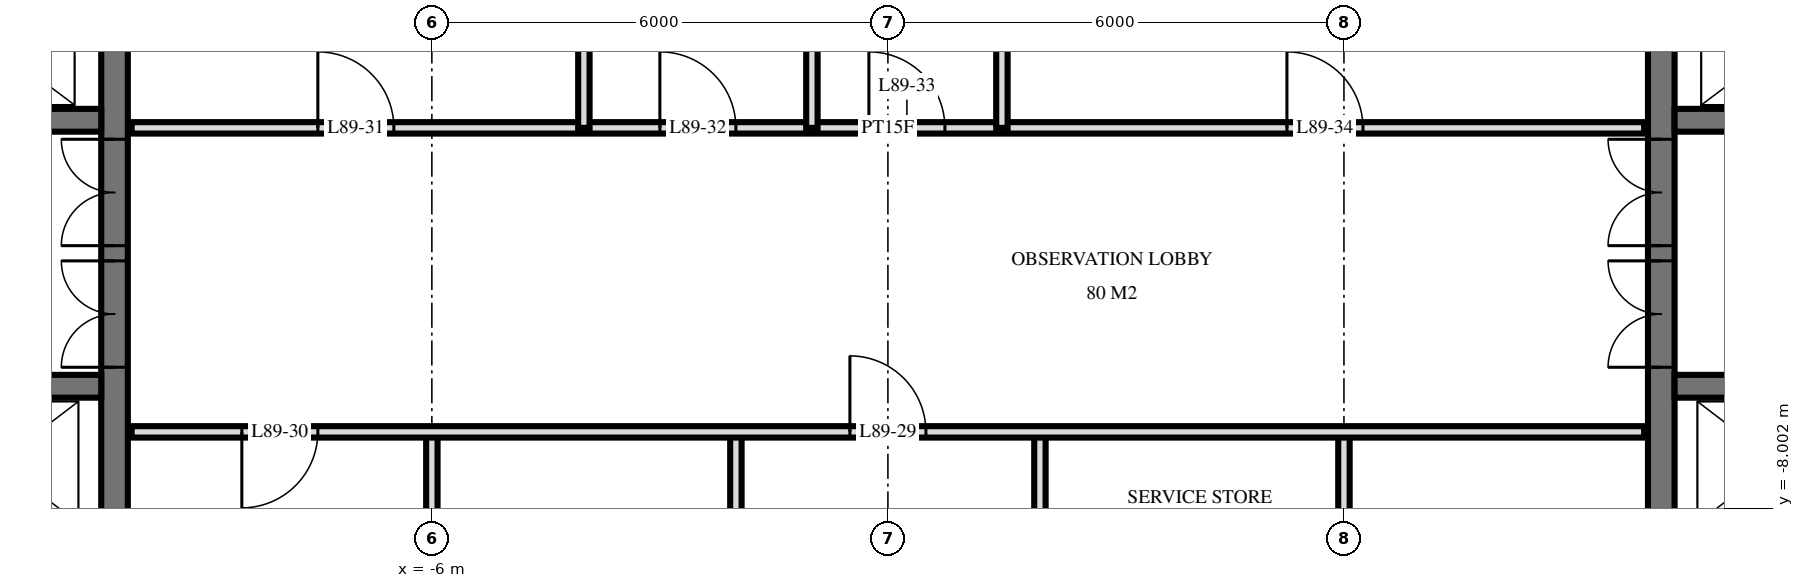
"""IFC4 building model, lengths in metres.
Left out: names, types, materials, properties, quantities, classifications, styles, units other than length and angle.
Written with IfcOpenShell. Run it as: python <this file> out.ifc"""

import sys

from ifc_helpers import new_model, si_unit, direction, frame, frame_2d, origin, place, context, subcontext, project, spatial, rectangle, extrude, element, fill, save


model = new_model("IFC4")
c1 = context("Model", 3, precision=1e-05, world=origin(), true_north=direction((0.0, 1.0)))
c2 = subcontext(c1, "Body", "Model", "MODEL_VIEW")
j1 = project(units=[si_unit("LENGTHUNIT", "METRE"), si_unit("PLANEANGLEUNIT", "RADIAN")], contexts=[c1])
p1 = place(None, origin())
s1 = spatial("IfcSite", under=j1, at=p1, CompositionType="ELEMENT")
p2 = place(p1, origin())
s2 = spatial("IfcBuilding", under=s1, at=p2, CompositionType="ELEMENT")
p3 = place(p2, frame((0.0, 0.0, 338.6)))
s3 = spatial("IfcBuildingStorey", under=s2, at=p3, CompositionType="ELEMENT", Elevation=338.6)
p4 = place(p3, frame((-10.175, -14.55, 0.0), z_axis=(0.0, 0.0, 1.0), x_axis=(0.0, 1.0, 0.0)))
e1 = element("IfcWall", 1, at=p4, inside=s3, PredefinedType="SHEAR", context=c2, shape_type="SweptSolid", body=[
    extrude(rectangle(XDim=14.1, YDim=0.35, at=frame_2d((7.05, 0.0))), origin(), (0.0, 0.0, 1.0), 4.0),
])
p5 = place(p4, frame((8.4, 0.0, 0.0)))
e2 = element("IfcOpeningElement", 2, at=p5, cuts=e1, PredefinedType="OPENING", context=c2, shape_type="SweptSolid", body=[
    extrude(rectangle(XDim=1.4, YDim=2.4, at=frame_2d((0.7, 1.2))), frame((0.0, 0.185, 0.0), z_axis=(0.0, -1.0, 0.0), x_axis=(1.0, 0.0, 0.0)), (0.0, 0.0, 1.0), 0.37),
])
p6 = place(p4, frame((10.0, 0.0, 0.0)))
e3 = element("IfcOpeningElement", 3, at=p6, cuts=e1, PredefinedType="OPENING", context=c2, shape_type="SweptSolid", body=[
    extrude(rectangle(XDim=1.4, YDim=2.4, at=frame_2d((0.7, 1.2))), frame((0.0, 0.185, 0.0), z_axis=(0.0, -1.0, 0.0), x_axis=(1.0, 0.0, 0.0)), (0.0, 0.0, 1.0), 0.37),
])
p7 = place(p4, frame((4.0, 0.0, 0.0)))
e4 = element("IfcOpeningElement", 4, at=p7, cuts=e1, PredefinedType="OPENING", context=c2, shape_type="SweptSolid", body=[
    extrude(rectangle(XDim=1.2, YDim=2.1, at=frame_2d((0.6, 1.05))), frame((0.0, 0.185, 0.0), z_axis=(0.0, -1.0, 0.0), x_axis=(1.0, 0.0, 0.0)), (0.0, 0.0, 1.0), 0.37),
])
p8 = place(p3, frame((-19.05, -2.9, 0.0), z_axis=(0.0, 0.0, 1.0), x_axis=(1.0, 0.0, 0.0)))
e5 = element("IfcWall", 5, at=p8, inside=s3, PredefinedType="SHEAR", context=c2, shape_type="SweptSolid", body=[
    extrude(rectangle(XDim=8.7, YDim=0.3, at=frame_2d((4.35, 0.0))), origin(), (0.0, 0.0, 1.0), 4.0),
])
p9 = place(p8, frame((6.8, 0.0, 0.0)))
e6 = element("IfcOpeningElement", 6, at=p9, cuts=e5, PredefinedType="OPENING", context=c2, shape_type="SweptSolid", body=[
    extrude(rectangle(XDim=1.1, YDim=2.1, at=frame_2d((0.55, 1.05))), frame((0.0, 0.16, 0.0), z_axis=(0.0, -1.0, 0.0), x_axis=(1.0, 0.0, 0.0)), (0.0, 0.0, 1.0), 0.32),
])
p10 = place(p8, frame((3.8, 0.0, 0.0)))
e7 = element("IfcOpeningElement", 7, at=p10, cuts=e5, PredefinedType="OPENING", context=c2, shape_type="SweptSolid", body=[
    extrude(rectangle(XDim=1.1, YDim=2.1, at=frame_2d((0.55, 1.05))), frame((0.0, 0.16, 0.0), z_axis=(0.0, -1.0, 0.0), x_axis=(1.0, 0.0, 0.0)), (0.0, 0.0, 1.0), 0.32),
])
p11 = place(p8, frame((1.613, 0.0, 0.0)))
e8 = element("IfcOpeningElement", 8, at=p11, cuts=e5, PredefinedType="OPENING", context=c2, shape_type="SweptSolid", body=[
    extrude(rectangle(XDim=0.9, YDim=2.1, at=frame_2d((0.45, 1.05))), frame((0.0, 0.16, 0.0), z_axis=(0.0, -1.0, 0.0), x_axis=(1.0, 0.0, 0.0)), (0.0, 0.0, 1.0), 0.32),
])
p12 = place(p8, frame((0.188, 0.0, 0.0)))
e9 = element("IfcOpeningElement", 9, at=p12, cuts=e5, PredefinedType="OPENING", context=c2, shape_type="SweptSolid", body=[
    extrude(rectangle(XDim=0.9, YDim=2.1, at=frame_2d((0.45, 1.05))), frame((0.0, 0.16, 0.0), z_axis=(0.0, -1.0, 0.0), x_axis=(1.0, 0.0, 0.0)), (0.0, 0.0, 1.0), 0.32),
])
p13 = place(p3, frame((-19.05, -6.4, 0.0), z_axis=(0.0, 0.0, 1.0), x_axis=(1.0, 0.0, 0.0)))
e10 = element("IfcWall", 10, at=p13, inside=s3, PredefinedType="SHEAR", context=c2, shape_type="SweptSolid", body=[
    extrude(rectangle(XDim=8.7, YDim=0.3, at=frame_2d((4.35, 0.0))), origin(), (0.0, 0.0, 1.0), 4.0),
])
p14 = place(p13, frame((6.8, 0.0, 0.0)))
e11 = element("IfcOpeningElement", 11, at=p14, cuts=e10, PredefinedType="OPENING", context=c2, shape_type="SweptSolid", body=[
    extrude(rectangle(XDim=1.1, YDim=2.1, at=frame_2d((0.55, 1.05))), frame((0.0, 0.16, 0.0), z_axis=(0.0, -1.0, 0.0), x_axis=(1.0, 0.0, 0.0)), (0.0, 0.0, 1.0), 0.32),
])
p15 = place(p13, frame((0.8, 0.0, 0.0)))
e12 = element("IfcOpeningElement", 12, at=p15, cuts=e10, PredefinedType="OPENING", context=c2, shape_type="SweptSolid", body=[
    extrude(rectangle(XDim=1.1, YDim=2.1, at=frame_2d((0.55, 1.05))), frame((0.0, 0.16, 0.0), z_axis=(0.0, -1.0, 0.0), x_axis=(1.0, 0.0, 0.0)), (0.0, 0.0, 1.0), 0.32),
])
p16 = place(p3, frame((10.175, -14.55, 0.0), z_axis=(0.0, 0.0, 1.0), x_axis=(0.0, 1.0, 0.0)))
e13 = element("IfcWall", 13, at=p16, inside=s3, PredefinedType="SHEAR", context=c2, shape_type="SweptSolid", body=[
    extrude(rectangle(XDim=14.1, YDim=0.35, at=frame_2d((7.05, 0.0))), origin(), (0.0, 0.0, 1.0), 4.0),
])
p17 = place(p16, frame((8.4, 0.0, 0.0)))
e14 = element("IfcOpeningElement", 14, at=p17, cuts=e13, PredefinedType="OPENING", context=c2, shape_type="SweptSolid", body=[
    extrude(rectangle(XDim=1.4, YDim=2.4, at=frame_2d((0.7, 1.2))), frame((0.0, 0.185, 0.0), z_axis=(0.0, -1.0, 0.0), x_axis=(1.0, 0.0, 0.0)), (0.0, 0.0, 1.0), 0.37),
])
p18 = place(p16, frame((10.0, 0.0, 0.0)))
e15 = element("IfcOpeningElement", 15, at=p18, cuts=e13, PredefinedType="OPENING", context=c2, shape_type="SweptSolid", body=[
    extrude(rectangle(XDim=1.4, YDim=2.4, at=frame_2d((0.7, 1.2))), frame((0.0, 0.185, 0.0), z_axis=(0.0, -1.0, 0.0), x_axis=(1.0, 0.0, 0.0)), (0.0, 0.0, 1.0), 0.37),
])
p19 = place(p16, frame((4.0, 0.0, 0.0)))
e16 = element("IfcOpeningElement", 16, at=p19, cuts=e13, PredefinedType="OPENING", context=c2, shape_type="SweptSolid", body=[
    extrude(rectangle(XDim=1.2, YDim=2.1, at=frame_2d((0.6, 1.05))), frame((0.0, 0.185, 0.0), z_axis=(0.0, -1.0, 0.0), x_axis=(1.0, 0.0, 0.0)), (0.0, 0.0, 1.0), 0.37),
])
p20 = place(p3, frame((10.35, -2.9, 0.0), z_axis=(0.0, 0.0, 1.0), x_axis=(1.0, 0.0, 0.0)))
e17 = element("IfcWall", 17, at=p20, inside=s3, PredefinedType="SHEAR", context=c2, shape_type="SweptSolid", body=[
    extrude(rectangle(XDim=8.7, YDim=0.3, at=frame_2d((4.35, 0.0))), origin(), (0.0, 0.0, 1.0), 4.0),
])
p21 = place(p20, frame((0.8, 0.0, 0.0)))
e18 = element("IfcOpeningElement", 18, at=p21, cuts=e17, PredefinedType="OPENING", context=c2, shape_type="SweptSolid", body=[
    extrude(rectangle(XDim=1.1, YDim=2.1, at=frame_2d((0.55, 1.05))), frame((0.0, 0.16, 0.0), z_axis=(0.0, -1.0, 0.0), x_axis=(1.0, 0.0, 0.0)), (0.0, 0.0, 1.0), 0.32),
])
p22 = place(p20, frame((3.8, 0.0, 0.0)))
e19 = element("IfcOpeningElement", 19, at=p22, cuts=e17, PredefinedType="OPENING", context=c2, shape_type="SweptSolid", body=[
    extrude(rectangle(XDim=1.1, YDim=2.1, at=frame_2d((0.55, 1.05))), frame((0.0, 0.16, 0.0), z_axis=(0.0, -1.0, 0.0), x_axis=(1.0, 0.0, 0.0)), (0.0, 0.0, 1.0), 0.32),
])
p23 = place(p20, frame((6.188, 0.0, 0.0)))
e20 = element("IfcOpeningElement", 20, at=p23, cuts=e17, PredefinedType="OPENING", context=c2, shape_type="SweptSolid", body=[
    extrude(rectangle(XDim=0.9, YDim=2.1, at=frame_2d((0.45, 1.05))), frame((0.0, 0.16, 0.0), z_axis=(0.0, -1.0, 0.0), x_axis=(1.0, 0.0, 0.0)), (0.0, 0.0, 1.0), 0.32),
])
p24 = place(p20, frame((7.613, 0.0, 0.0)))
e21 = element("IfcOpeningElement", 21, at=p24, cuts=e17, PredefinedType="OPENING", context=c2, shape_type="SweptSolid", body=[
    extrude(rectangle(XDim=0.9, YDim=2.1, at=frame_2d((0.45, 1.05))), frame((0.0, 0.16, 0.0), z_axis=(0.0, -1.0, 0.0), x_axis=(1.0, 0.0, 0.0)), (0.0, 0.0, 1.0), 0.32),
])
p25 = place(p3, frame((10.35, -6.4, 0.0), z_axis=(0.0, 0.0, 1.0), x_axis=(1.0, 0.0, 0.0)))
e22 = element("IfcWall", 22, at=p25, inside=s3, PredefinedType="SHEAR", context=c2, shape_type="SweptSolid", body=[
    extrude(rectangle(XDim=8.7, YDim=0.3, at=frame_2d((4.35, 0.0))), origin(), (0.0, 0.0, 1.0), 4.0),
])
p26 = place(p25, frame((0.8, 0.0, 0.0)))
e23 = element("IfcOpeningElement", 23, at=p26, cuts=e22, PredefinedType="OPENING", context=c2, shape_type="SweptSolid", body=[
    extrude(rectangle(XDim=1.1, YDim=2.1, at=frame_2d((0.55, 1.05))), frame((0.0, 0.16, 0.0), z_axis=(0.0, -1.0, 0.0), x_axis=(1.0, 0.0, 0.0)), (0.0, 0.0, 1.0), 0.32),
])
p27 = place(p25, frame((6.8, 0.0, 0.0)))
e24 = element("IfcOpeningElement", 24, at=p27, cuts=e22, PredefinedType="OPENING", context=c2, shape_type="SweptSolid", body=[
    extrude(rectangle(XDim=1.1, YDim=2.1, at=frame_2d((0.55, 1.05))), frame((0.0, 0.16, 0.0), z_axis=(0.0, -1.0, 0.0), x_axis=(1.0, 0.0, 0.0)), (0.0, 0.0, 1.0), 0.32),
])
p28 = place(p3, frame((6.0, -11.0, 0.0), z_axis=(0.0, 0.0, 1.0), x_axis=(0.0, 1.0, 0.0)))
e25 = element("IfcWall", 25, at=p28, inside=s3, PredefinedType="PARTITIONING", context=c2, shape_type="SweptSolid", body=[
    extrude(rectangle(XDim=4.0, YDim=0.15, at=frame_2d((2.0, 0.0))), origin(), (0.0, 0.0, 1.0), 3.72),
])
p29 = place(p3, frame((2.0, -11.0, 0.0), z_axis=(0.0, 0.0, 1.0), x_axis=(0.0, 1.0, 0.0)))
e26 = element("IfcWall", 26, at=p29, inside=s3, PredefinedType="PARTITIONING", context=c2, shape_type="SweptSolid", body=[
    extrude(rectangle(XDim=4.0, YDim=0.15, at=frame_2d((2.0, 0.0))), origin(), (0.0, 0.0, 1.0), 3.72),
])
p30 = place(p29, frame((1.5, 0.0, 0.0)))
e27 = element("IfcOpeningElement", 27, at=p30, cuts=e26, PredefinedType="OPENING", context=c2, shape_type="SweptSolid", body=[
    extrude(rectangle(XDim=1.0, YDim=2.1, at=frame_2d((0.5, 1.05))), frame((0.0, 0.085, 0.0), z_axis=(0.0, -1.0, 0.0), x_axis=(1.0, 0.0, 0.0)), (0.0, 0.0, 1.0), 0.17),
])
p31 = place(p3, frame((1.5, -3.0, 0.0), z_axis=(0.0, 0.0, 1.0), x_axis=(0.0, 1.0, 0.0)))
e28 = element("IfcWall", 28, at=p31, inside=s3, PredefinedType="PLUMBINGWALL", context=c2, shape_type="SweptSolid", body=[
    extrude(rectangle(XDim=6.709, YDim=0.15, at=frame_2d((3.354, 0.0))), origin(), (0.0, 0.0, 1.0), 3.72),
])
p32 = place(p3, frame((-1.0, -3.0, 0.0), z_axis=(0.0, 0.0, 1.0), x_axis=(0.0, 1.0, 0.0)))
e29 = element("IfcWall", 29, at=p32, inside=s3, PredefinedType="PLUMBINGWALL", context=c2, shape_type="SweptSolid", body=[
    extrude(rectangle(XDim=6.402, YDim=0.15, at=frame_2d((3.201, 0.0))), origin(), (0.0, 0.0, 1.0), 3.72),
])
p33 = place(p3, frame((-2.0, -11.0, 0.0), z_axis=(0.0, 0.0, 1.0), x_axis=(0.0, 1.0, 0.0)))
e30 = element("IfcWall", 30, at=p33, inside=s3, PredefinedType="PARTITIONING", context=c2, shape_type="SweptSolid", body=[
    extrude(rectangle(XDim=4.0, YDim=0.15, at=frame_2d((2.0, 0.0))), origin(), (0.0, 0.0, 1.0), 3.72),
])
p34 = place(p33, frame((1.5, 0.0, 0.0)))
e31 = element("IfcOpeningElement", 31, at=p34, cuts=e30, PredefinedType="OPENING", context=c2, shape_type="SweptSolid", body=[
    extrude(rectangle(XDim=1.0, YDim=2.1, at=frame_2d((0.5, 1.05))), frame((0.0, 0.085, 0.0), z_axis=(0.0, -1.0, 0.0), x_axis=(1.0, 0.0, 0.0)), (0.0, 0.0, 1.0), 0.17),
])
p35 = place(p3, frame((-4.0, -3.0, 0.0), z_axis=(0.0, 0.0, 1.0), x_axis=(0.0, 1.0, 0.0)))
e32 = element("IfcWall", 32, at=p35, inside=s3, PredefinedType="PLUMBINGWALL", context=c2, shape_type="SweptSolid", body=[
    extrude(rectangle(XDim=6.033, YDim=0.15, at=frame_2d((3.017, 0.0))), origin(), (0.0, 0.0, 1.0), 3.72),
])
p36 = place(p3, frame((-6.0, -11.0, 0.0), z_axis=(0.0, 0.0, 1.0), x_axis=(0.0, 1.0, 0.0)))
e33 = element("IfcWall", 33, at=p36, inside=s3, PredefinedType="PARTITIONING", context=c2, shape_type="SweptSolid", body=[
    extrude(rectangle(XDim=4.0, YDim=0.15, at=frame_2d((2.0, 0.0))), origin(), (0.0, 0.0, 1.0), 3.72),
])
p37 = place(p3, frame((-9.95, -7.0, 0.0), z_axis=(0.0, 0.0, 1.0), x_axis=(1.0, 0.0, 0.0)))
e34 = element("IfcWall", 34, at=p37, inside=s3, PredefinedType="PARTITIONING", context=c2, shape_type="SweptSolid", body=[
    extrude(rectangle(XDim=19.9, YDim=0.15, at=frame_2d((9.95, 0.0))), origin(), (0.0, 0.0, 1.0), 3.72),
])
p38 = place(p37, frame((9.45, 0.0, 0.0)))
e35 = element("IfcOpeningElement", 35, at=p38, cuts=e34, PredefinedType="OPENING", context=c2, shape_type="SweptSolid", body=[
    extrude(rectangle(XDim=1.0, YDim=2.1, at=frame_2d((0.5, 1.05))), frame((0.0, 0.085, 0.0), z_axis=(0.0, -1.0, 0.0), x_axis=(1.0, 0.0, 0.0)), (0.0, 0.0, 1.0), 0.17),
])
p39 = place(p37, frame((1.45, 0.0, 0.0)))
e36 = element("IfcOpeningElement", 36, at=p39, cuts=e34, PredefinedType="OPENING", context=c2, shape_type="SweptSolid", body=[
    extrude(rectangle(XDim=1.0, YDim=2.1, at=frame_2d((0.5, 1.05))), frame((0.0, 0.085, 0.0), z_axis=(0.0, -1.0, 0.0), x_axis=(1.0, 0.0, 0.0)), (0.0, 0.0, 1.0), 0.17),
])
p40 = place(p3, frame((-9.95, -3.0, 0.0), z_axis=(0.0, 0.0, 1.0), x_axis=(1.0, 0.0, 0.0)))
e37 = element("IfcWall", 37, at=p40, inside=s3, PredefinedType="PARTITIONING", context=c2, shape_type="SweptSolid", body=[
    extrude(rectangle(XDim=19.9, YDim=0.15, at=frame_2d((9.95, 0.0))), origin(), (0.0, 0.0, 1.0), 3.72),
])
p41 = place(p40, frame((2.45, 0.0, 0.0)))
e38 = element("IfcOpeningElement", 38, at=p41, cuts=e37, PredefinedType="OPENING", context=c2, shape_type="SweptSolid", body=[
    extrude(rectangle(XDim=1.0, YDim=2.1, at=frame_2d((0.5, 1.05))), frame((0.0, 0.085, 0.0), z_axis=(0.0, -1.0, 0.0), x_axis=(1.0, 0.0, 0.0)), (0.0, 0.0, 1.0), 0.17),
])
p42 = place(p40, frame((6.95, 0.0, 0.0)))
e39 = element("IfcOpeningElement", 39, at=p42, cuts=e37, PredefinedType="OPENING", context=c2, shape_type="SweptSolid", body=[
    extrude(rectangle(XDim=1.0, YDim=2.1, at=frame_2d((0.5, 1.05))), frame((0.0, 0.085, 0.0), z_axis=(0.0, -1.0, 0.0), x_axis=(1.0, 0.0, 0.0)), (0.0, 0.0, 1.0), 0.17),
])
p43 = place(p40, frame((9.7, 0.0, 0.0)))
e40 = element("IfcOpeningElement", 40, at=p43, cuts=e37, PredefinedType="OPENING", context=c2, shape_type="SweptSolid", body=[
    extrude(rectangle(XDim=1.0, YDim=2.1, at=frame_2d((0.5, 1.05))), frame((0.0, 0.085, 0.0), z_axis=(0.0, -1.0, 0.0), x_axis=(1.0, 0.0, 0.0)), (0.0, 0.0, 1.0), 0.17),
])
p44 = place(p40, frame((15.2, 0.0, 0.0)))
e41 = element("IfcOpeningElement", 41, at=p44, cuts=e37, PredefinedType="OPENING", context=c2, shape_type="SweptSolid", body=[
    extrude(rectangle(XDim=1.0, YDim=2.1, at=frame_2d((0.5, 1.05))), frame((0.0, 0.085, 0.0), z_axis=(0.0, -1.0, 0.0), x_axis=(1.0, 0.0, 0.0)), (0.0, 0.0, 1.0), 0.17),
])
p45 = place(p5, origin())
e42 = element("IfcDoor", 42, at=p45, inside=s3, OperationType="DOUBLE_DOOR_SINGLE_SWING", PredefinedType="DOOR", context=c2, shape_type="SweptSolid", body=[
    extrude(rectangle(XDim=1.4, YDim=2.4, at=frame_2d((0.7, 1.2))), frame((0.0, 0.025, 0.0), z_axis=(0.0, -1.0, 0.0), x_axis=(1.0, 0.0, 0.0)), (0.0, 0.0, 1.0), 0.05),
])
fill(e2, e42)
p46 = place(p6, origin())
e43 = element("IfcDoor", 43, at=p46, inside=s3, OperationType="DOUBLE_DOOR_SINGLE_SWING", PredefinedType="DOOR", context=c2, shape_type="SweptSolid", body=[
    extrude(rectangle(XDim=1.4, YDim=2.4, at=frame_2d((0.7, 1.2))), frame((0.0, 0.025, 0.0), z_axis=(0.0, -1.0, 0.0), x_axis=(1.0, 0.0, 0.0)), (0.0, 0.0, 1.0), 0.05),
])
fill(e3, e43)
p47 = place(p17, origin())
e44 = element("IfcDoor", 44, at=p47, inside=s3, OperationType="DOUBLE_DOOR_SINGLE_SWING", PredefinedType="DOOR", context=c2, shape_type="SweptSolid", body=[
    extrude(rectangle(XDim=1.4, YDim=2.4, at=frame_2d((0.7, 1.2))), frame((0.0, 0.025, 0.0), z_axis=(0.0, -1.0, 0.0), x_axis=(1.0, 0.0, 0.0)), (0.0, 0.0, 1.0), 0.05),
])
fill(e14, e44)
p48 = place(p18, origin())
e45 = element("IfcDoor", 45, at=p48, inside=s3, OperationType="DOUBLE_DOOR_SINGLE_SWING", PredefinedType="DOOR", context=c2, shape_type="SweptSolid", body=[
    extrude(rectangle(XDim=1.4, YDim=2.4, at=frame_2d((0.7, 1.2))), frame((0.0, 0.025, 0.0), z_axis=(0.0, -1.0, 0.0), x_axis=(1.0, 0.0, 0.0)), (0.0, 0.0, 1.0), 0.05),
])
fill(e15, e45)
p49 = place(p38, origin())
e46 = element("IfcDoor", 46, at=p49, inside=s3, OperationType="SINGLE_SWING_RIGHT", PredefinedType="DOOR", context=c2, shape_type="SweptSolid", body=[
    extrude(rectangle(XDim=1.0, YDim=2.1, at=frame_2d((0.5, 1.05))), frame((0.0, 0.025, 0.0), z_axis=(0.0, -1.0, 0.0), x_axis=(1.0, 0.0, 0.0)), (0.0, 0.0, 1.0), 0.05),
])
fill(e35, e46)
p50 = place(p39, frame((0.5, 0.0, 0.0), z_axis=(0.0, 0.0, 1.0), x_axis=(-1.0, 0.0, 0.0)))
e47 = element("IfcDoor", 47, at=p50, inside=s3, OperationType="SINGLE_SWING_LEFT", PredefinedType="DOOR", context=c2, shape_type="SweptSolid", body=[
    extrude(rectangle(XDim=1.0, YDim=2.1, at=frame_2d((0.0, 1.05))), frame((0.0, -0.025, 0.0), z_axis=(0.0, 1.0, 0.0), x_axis=(-1.0, 0.0, 0.0)), (0.0, 0.0, 1.0), 0.05),
])
fill(e36, e47)
p51 = place(p41, origin())
e48 = element("IfcDoor", 48, at=p51, inside=s3, OperationType="SINGLE_SWING_RIGHT", PredefinedType="DOOR", context=c2, shape_type="SweptSolid", body=[
    extrude(rectangle(XDim=1.0, YDim=2.1, at=frame_2d((0.5, 1.05))), frame((0.0, 0.025, 0.0), z_axis=(0.0, -1.0, 0.0), x_axis=(1.0, 0.0, 0.0)), (0.0, 0.0, 1.0), 0.05),
])
fill(e38, e48)
p52 = place(p42, origin())
e49 = element("IfcDoor", 49, at=p52, inside=s3, OperationType="SINGLE_SWING_RIGHT", PredefinedType="DOOR", context=c2, shape_type="SweptSolid", body=[
    extrude(rectangle(XDim=1.0, YDim=2.1, at=frame_2d((0.5, 1.05))), frame((0.0, 0.025, 0.0), z_axis=(0.0, -1.0, 0.0), x_axis=(1.0, 0.0, 0.0)), (0.0, 0.0, 1.0), 0.05),
])
fill(e39, e49)
p53 = place(p43, origin())
e50 = element("IfcDoor", 50, at=p53, inside=s3, OperationType="SINGLE_SWING_RIGHT", PredefinedType="DOOR", context=c2, shape_type="SweptSolid", body=[
    extrude(rectangle(XDim=1.0, YDim=2.1, at=frame_2d((0.5, 1.05))), frame((0.0, 0.025, 0.0), z_axis=(0.0, -1.0, 0.0), x_axis=(1.0, 0.0, 0.0)), (0.0, 0.0, 1.0), 0.05),
])
fill(e40, e50)
p54 = place(p44, origin())
e51 = element("IfcDoor", 51, at=p54, inside=s3, OperationType="SINGLE_SWING_RIGHT", PredefinedType="DOOR", context=c2, shape_type="SweptSolid", body=[
    extrude(rectangle(XDim=1.0, YDim=2.1, at=frame_2d((0.5, 1.05))), frame((0.0, 0.025, 0.0), z_axis=(0.0, -1.0, 0.0), x_axis=(1.0, 0.0, 0.0)), (0.0, 0.0, 1.0), 0.05),
])
fill(e41, e51)
save(model, sys.argv[1])
